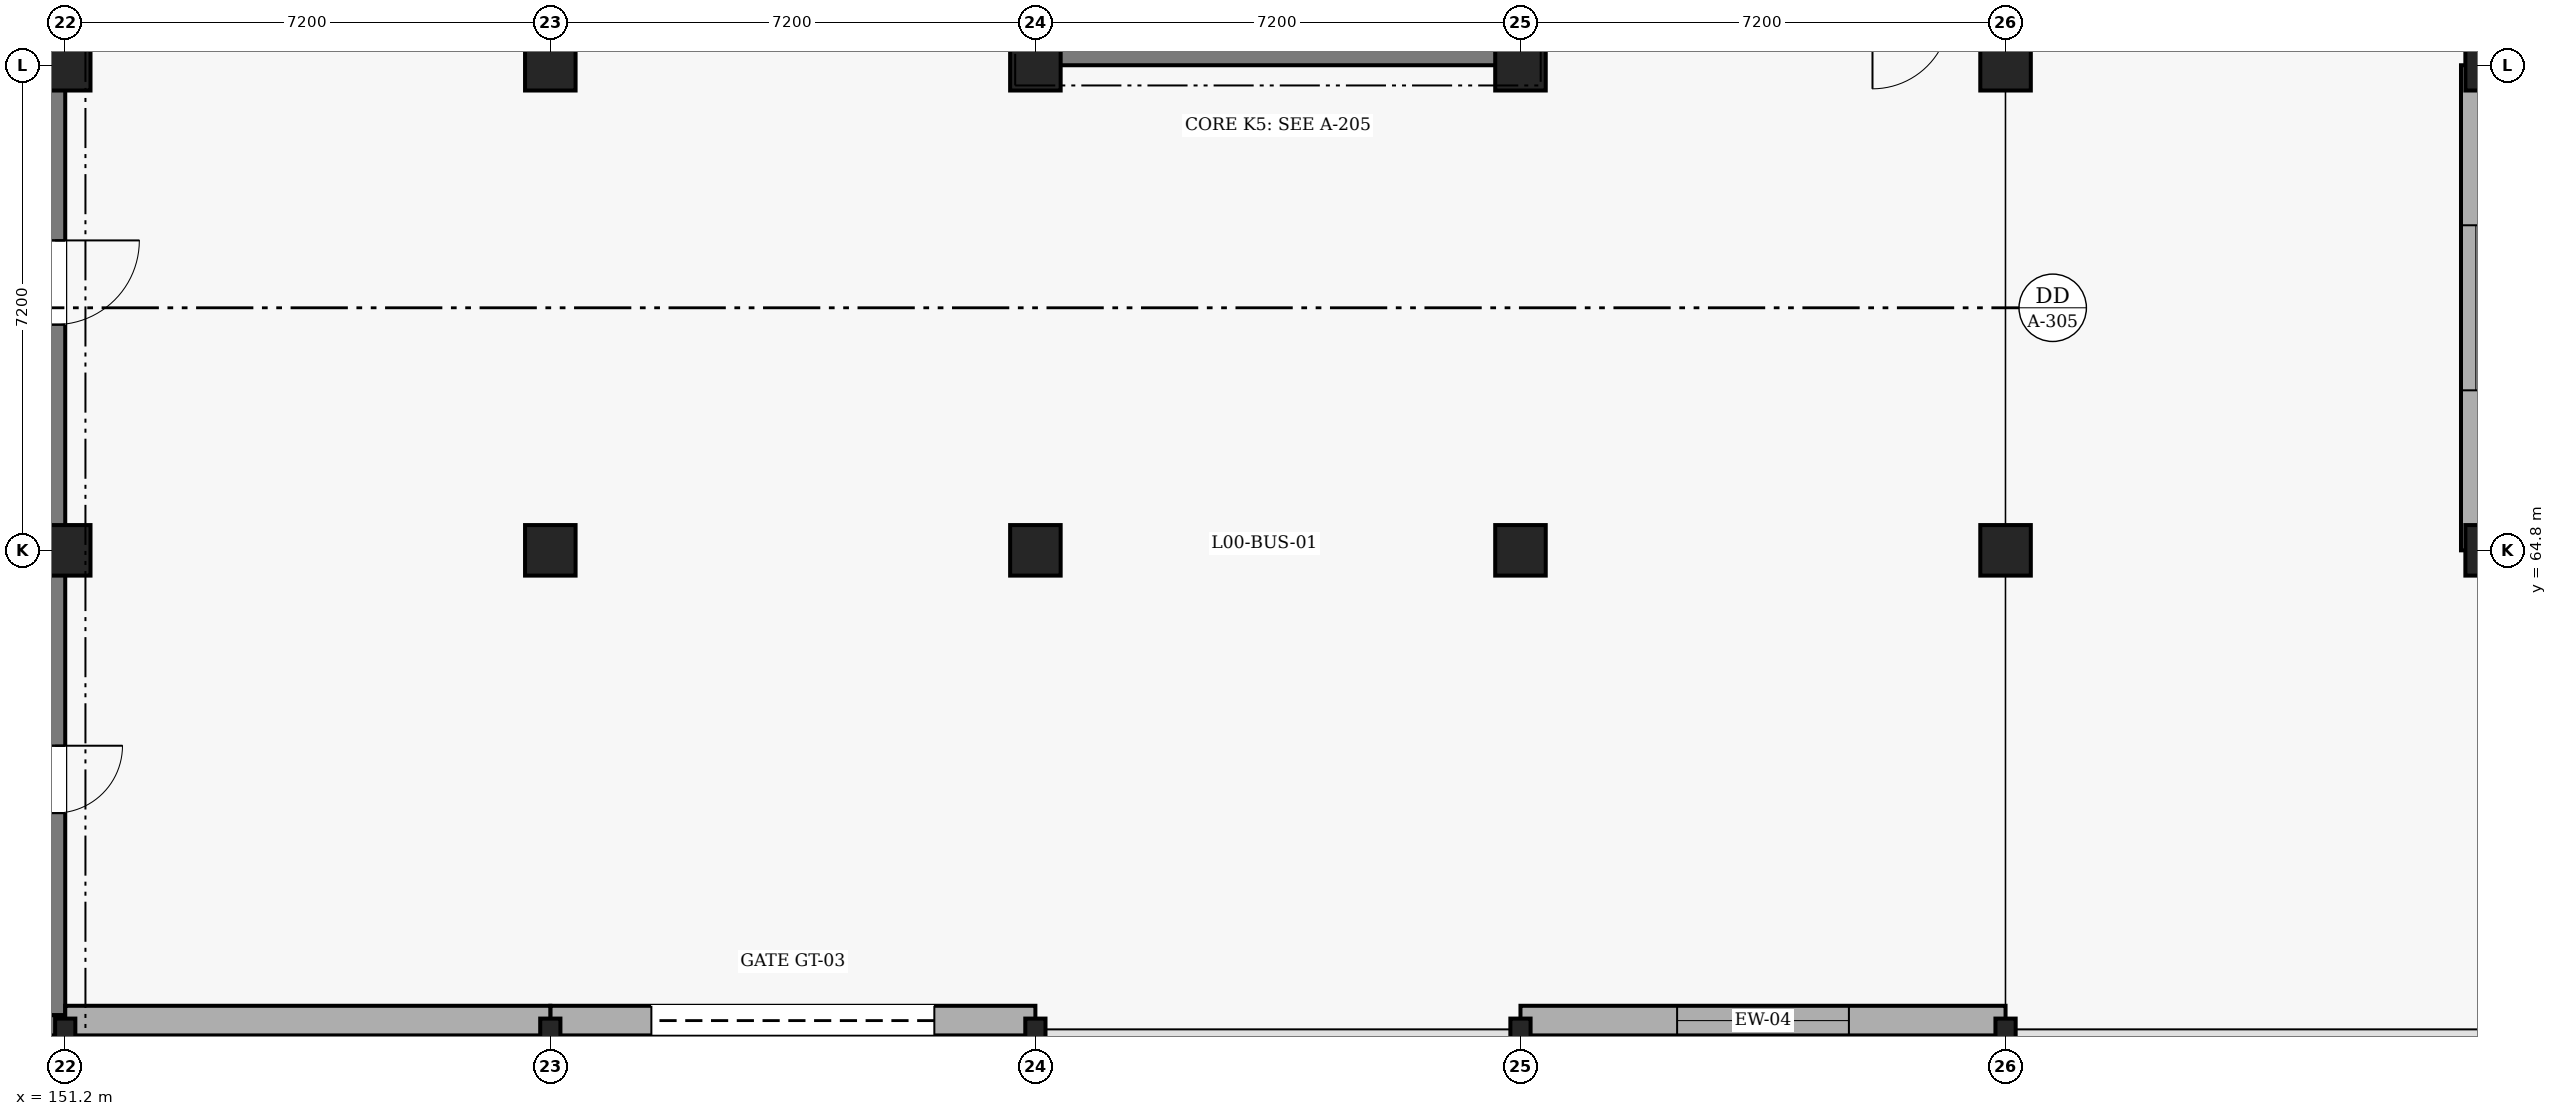
"""IFC4 building model, lengths in metres.
Left out: names, types, materials, properties, quantities, classifications, styles, units other than length and angle.
Written with IfcOpenShell. Run it as: python <this file> out.ifc"""

import sys

from ifc_helpers import new_model, si_unit, direction, frame, frame_2d, origin, origin_2d, place, context, subcontext, project, spatial, rectangle, i_section, extrude, element, fill, save


model = new_model("IFC4")
c1 = context("Model", 3, precision=1e-05, world=origin(), true_north=direction((0.0, 1.0)))
c2 = subcontext(c1, "Body", "Model", "MODEL_VIEW")
j1 = project(units=[si_unit("LENGTHUNIT", "METRE"), si_unit("PLANEANGLEUNIT", "RADIAN")], contexts=[c1])
p1 = place(None, origin())
s1 = spatial("IfcSite", under=j1, at=p1, CompositionType="ELEMENT")
p2 = place(p1, origin())
s2 = spatial("IfcBuilding", under=s1, at=p2, CompositionType="ELEMENT")
p3 = place(p2, origin())
s3 = spatial("IfcBuildingStorey", under=s2, at=p3, CompositionType="ELEMENT", Elevation=0.0)
p4 = place(p3, frame((136.8, 71.85, 0.0), z_axis=(0.0, 0.0, 1.0), x_axis=(1.0, 0.0, 0.0)))
e1 = element("IfcWall", 1, at=p4, inside=s3, PredefinedType="SHEAR", context=c2, shape_type="SweptSolid", body=[
    extrude(rectangle(XDim=14.4, YDim=0.3, at=frame_2d((7.2, 0.0))), origin(), (0.0, 0.0, 1.0), 5.4),
])
p5 = place(p3, frame((151.05, 71.7, 0.0), z_axis=(0.0, 0.0, 1.0), x_axis=(0.0, -1.0, 0.0)))
e2 = element("IfcWall", 2, at=p5, inside=s3, PredefinedType="SHEAR", context=c2, shape_type="SweptSolid", body=[
    extrude(rectangle(XDim=13.8, YDim=0.3, at=frame_2d((6.9, 0.0))), origin(), (0.0, 0.0, 1.0), 5.4),
])
p6 = place(p5, frame((9.8, 0.0, 0.0)))
e3 = element("IfcOpeningElement", 3, at=p6, cuts=e2, PredefinedType="OPENING", context=c2, shape_type="SweptSolid", body=[
    extrude(rectangle(XDim=1.0, YDim=2.15, at=frame_2d((0.5, 1.075))), frame((0.0, 0.16, 0.0), z_axis=(0.0, -1.0, 0.0), x_axis=(1.0, 0.0, 0.0)), (0.0, 0.0, 1.0), 0.32),
])
p7 = place(p5, frame((2.3, 0.0, 0.0)))
e4 = element("IfcOpeningElement", 4, at=p7, cuts=e2, PredefinedType="OPENING", context=c2, shape_type="SweptSolid", body=[
    extrude(rectangle(XDim=1.25, YDim=2.2, at=frame_2d((0.625, 1.1))), frame((0.0, 0.16, 0.0), z_axis=(0.0, -1.0, 0.0), x_axis=(1.0, 0.0, 0.0)), (0.0, 0.0, 1.0), 0.32),
])
p8 = place(p3, frame((151.2, 57.75, 0.0), z_axis=(0.0, 0.0, 1.0), x_axis=(-1.0, 0.0, 0.0)))
e5 = element("IfcWall", 5, at=p8, inside=s3, PredefinedType="SHEAR", context=c2, shape_type="SweptSolid", body=[
    extrude(rectangle(XDim=14.4, YDim=0.3, at=frame_2d((7.2, 0.0))), origin(), (0.0, 0.0, 1.0), 5.4),
])
p9 = place(p3, frame((172.8, 72.135, 0.0), z_axis=(0.0, 0.0, 1.0), x_axis=(-1.0, 0.0, 0.0)))
e6 = element("IfcWall", 6, at=p9, inside=s3, PredefinedType="SHEAR", context=c2, shape_type="SweptSolid", body=[
    extrude(rectangle(XDim=7.2, YDim=0.27, at=frame_2d((3.6, 0.0))), origin(), (0.0, 0.0, 1.0), 5.4),
])
p10 = place(p3, frame((151.2, 57.6, 0.0), z_axis=(0.0, 0.0, 1.0), x_axis=(1.0, 0.0, 0.0)))
e7 = element("IfcColumn", 7, at=p10, inside=s3, PredefinedType="COLUMN", context=c2, shape_type="SweptSolid", body=[
    extrude(i_section(OverallWidth=0.3, OverallDepth=0.5, WebThickness=0.014, FlangeThickness=0.028, FilletRadius=0.027, at=origin_2d()), origin(), (0.0, 0.0, 1.0), 5.1),
])
for number, where, z_axis, x_axis in (
    (8, (151.2, 64.8, 0.0), (0.0, 0.0, 1.0), (1.0, 0.0, 0.0)),
    (9, (151.2, 72.0, 0.0), (0.0, 0.0, 1.0), (1.0, 0.0, 0.0)),
):
    element("IfcColumn", number, at=place(p3, frame(where, z_axis=z_axis, x_axis=x_axis)), inside=s3, PredefinedType="COLUMN", context=c2, shape_type="SweptSolid", body=[
        extrude(rectangle(XDim=0.75, YDim=0.75, at=origin_2d()), origin(), (0.0, 0.0, 1.0), 5.1),
    ])
p11 = place(p3, frame((158.4, 57.6, 0.0), z_axis=(0.0, 0.0, 1.0), x_axis=(1.0, 0.0, 0.0)))
e10 = element("IfcColumn", 10, at=p11, inside=s3, PredefinedType="COLUMN", context=c2, shape_type="SweptSolid", body=[
    extrude(i_section(OverallWidth=0.3, OverallDepth=0.5, WebThickness=0.014, FlangeThickness=0.028, FilletRadius=0.027, at=origin_2d()), origin(), (0.0, 0.0, 1.0), 5.1),
])
for number, where, z_axis, x_axis in (
    (11, (158.4, 64.8, 0.0), (0.0, 0.0, 1.0), (1.0, 0.0, 0.0)),
    (12, (158.4, 72.0, 0.0), (0.0, 0.0, 1.0), (1.0, 0.0, 0.0)),
):
    element("IfcColumn", number, at=place(p3, frame(where, z_axis=z_axis, x_axis=x_axis)), inside=s3, PredefinedType="COLUMN", context=c2, shape_type="SweptSolid", body=[
        extrude(rectangle(XDim=0.75, YDim=0.75, at=origin_2d()), origin(), (0.0, 0.0, 1.0), 5.1),
    ])
p12 = place(p3, frame((165.6, 57.6, 0.0), z_axis=(0.0, 0.0, 1.0), x_axis=(1.0, 0.0, 0.0)))
e13 = element("IfcColumn", 13, at=p12, inside=s3, PredefinedType="COLUMN", context=c2, shape_type="SweptSolid", body=[
    extrude(i_section(OverallWidth=0.3, OverallDepth=0.5, WebThickness=0.014, FlangeThickness=0.028, FilletRadius=0.027, at=origin_2d()), origin(), (0.0, 0.0, 1.0), 5.1),
])
for number, where, z_axis, x_axis in (
    (14, (165.6, 64.8, 0.0), (0.0, 0.0, 1.0), (1.0, 0.0, 0.0)),
    (15, (165.6, 72.0, 0.0), (0.0, 0.0, 1.0), (1.0, 0.0, 0.0)),
):
    element("IfcColumn", number, at=place(p3, frame(where, z_axis=z_axis, x_axis=x_axis)), inside=s3, PredefinedType="COLUMN", context=c2, shape_type="SweptSolid", body=[
        extrude(rectangle(XDim=0.75, YDim=0.75, at=origin_2d()), origin(), (0.0, 0.0, 1.0), 5.1),
    ])
p13 = place(p3, frame((172.8, 57.6, 0.0), z_axis=(0.0, 0.0, 1.0), x_axis=(1.0, 0.0, 0.0)))
e16 = element("IfcColumn", 16, at=p13, inside=s3, PredefinedType="COLUMN", context=c2, shape_type="SweptSolid", body=[
    extrude(i_section(OverallWidth=0.3, OverallDepth=0.5, WebThickness=0.014, FlangeThickness=0.028, FilletRadius=0.027, at=origin_2d()), origin(), (0.0, 0.0, 1.0), 5.1),
])
for number, where, z_axis, x_axis in (
    (17, (172.8, 64.8, 0.0), (0.0, 0.0, 1.0), (1.0, 0.0, 0.0)),
    (18, (172.8, 72.0, 0.0), (0.0, 0.0, 1.0), (1.0, 0.0, 0.0)),
):
    element("IfcColumn", number, at=place(p3, frame(where, z_axis=z_axis, x_axis=x_axis)), inside=s3, PredefinedType="COLUMN", context=c2, shape_type="SweptSolid", body=[
        extrude(rectangle(XDim=0.75, YDim=0.75, at=origin_2d()), origin(), (0.0, 0.0, 1.0), 5.1),
    ])
p14 = place(p3, frame((180.0, 57.6, 0.0), z_axis=(0.0, 0.0, 1.0), x_axis=(1.0, 0.0, 0.0)))
e19 = element("IfcColumn", 19, at=p14, inside=s3, PredefinedType="COLUMN", context=c2, shape_type="SweptSolid", body=[
    extrude(i_section(OverallWidth=0.3, OverallDepth=0.5, WebThickness=0.014, FlangeThickness=0.028, FilletRadius=0.027, at=origin_2d()), origin(), (0.0, 0.0, 1.0), 5.1),
])
for number, where, z_axis, x_axis in (
    (20, (180.0, 64.8, 0.0), (0.0, 0.0, 1.0), (1.0, 0.0, 0.0)),
    (21, (180.0, 72.0, 0.0), (0.0, 0.0, 1.0), (1.0, 0.0, 0.0)),
    (22, (187.2, 64.8, 0.0), (0.0, 0.0, 1.0), (1.0, 0.0, 0.0)),
    (23, (187.2, 72.0, 0.0), (0.0, 0.0, 1.0), (1.0, 0.0, 0.0)),
):
    element("IfcColumn", number, at=place(p3, frame(where, z_axis=z_axis, x_axis=x_axis)), inside=s3, PredefinedType="COLUMN", context=c2, shape_type="SweptSolid", body=[
        extrude(rectangle(XDim=0.75, YDim=0.75, at=origin_2d()), origin(), (0.0, 0.0, 1.0), 5.1),
    ])
p15 = place(p3, frame((186.98, 72.0, 0.0), z_axis=(0.0, 0.0, 1.0), x_axis=(0.0, -1.0, 0.0)))
e24 = element("IfcWall", 24, at=p15, inside=s3, PredefinedType="SOLIDWALL", context=c2, shape_type="SweptSolid", body=[
    extrude(rectangle(XDim=7.2, YDim=0.44, at=frame_2d((3.6, 0.0))), origin(), (0.0, 0.0, 1.0), 4.77),
])
p16 = place(p15, frame((2.375, 0.0, 0.9)))
e25 = element("IfcOpeningElement", 25, at=p16, cuts=e24, PredefinedType="OPENING", context=c2, shape_type="SweptSolid", body=[
    extrude(rectangle(XDim=2.45, YDim=1.55, at=frame_2d((1.225, 0.775))), frame((0.0, 0.23, 0.0), z_axis=(0.0, -1.0, 0.0), x_axis=(1.0, 0.0, 0.0)), (0.0, 0.0, 1.0), 0.46),
])
p17 = place(p3, frame((180.0, 57.82, 0.0), z_axis=(0.0, 0.0, 1.0), x_axis=(-1.0, 0.0, 0.0)))
e26 = element("IfcWall", 26, at=p17, inside=s3, PredefinedType="SOLIDWALL", context=c2, shape_type="SweptSolid", body=[
    extrude(rectangle(XDim=7.2, YDim=0.44, at=frame_2d((3.6, 0.0))), origin(), (0.0, 0.0, 1.0), 4.6),
])
p18 = place(p17, frame((2.325, 0.0, 0.9)))
e27 = element("IfcOpeningElement", 27, at=p18, cuts=e26, PredefinedType="OPENING", context=c2, shape_type="SweptSolid", body=[
    extrude(rectangle(XDim=2.55, YDim=1.6, at=frame_2d((1.275, 0.8))), frame((0.0, 0.23, 0.0), z_axis=(0.0, -1.0, 0.0), x_axis=(1.0, 0.0, 0.0)), (0.0, 0.0, 1.0), 0.46),
])
p19 = place(p3, frame((165.6, 57.82, 0.0), z_axis=(0.0, 0.0, 1.0), x_axis=(-1.0, 0.0, 0.0)))
e28 = element("IfcWall", 28, at=p19, inside=s3, PredefinedType="SOLIDWALL", context=c2, shape_type="SweptSolid", body=[
    extrude(rectangle(XDim=7.2, YDim=0.44, at=frame_2d((3.6, 0.0))), origin(), (0.0, 0.0, 1.0), 4.6),
])
p20 = place(p19, frame((1.5, 0.0, 0.0)))
e29 = element("IfcOpeningElement", 29, at=p20, cuts=e28, PredefinedType="OPENING", context=c2, shape_type="SweptSolid", body=[
    extrude(rectangle(XDim=4.2, YDim=2.8, at=frame_2d((2.1, 1.4))), frame((0.0, 0.23, 0.0), z_axis=(0.0, -1.0, 0.0), x_axis=(1.0, 0.0, 0.0)), (0.0, 0.0, 1.0), 0.46),
])
p21 = place(p3, frame((158.4, 57.82, 0.0), z_axis=(0.0, 0.0, 1.0), x_axis=(-1.0, 0.0, 0.0)))
e30 = element("IfcWall", 30, at=p21, inside=s3, PredefinedType="SOLIDWALL", context=c2, shape_type="SweptSolid", body=[
    extrude(rectangle(XDim=7.2, YDim=0.44, at=frame_2d((3.6, 0.0))), origin(), (0.0, 0.0, 1.0), 4.6),
])
p22 = place(p16, origin())
e31 = element("IfcWindow", 31, at=p22, inside=s3, PartitioningType="SINGLE_PANEL", PredefinedType="WINDOW", context=c2, shape_type="SweptSolid", body=[
    extrude(rectangle(XDim=2.45, YDim=1.55, at=frame_2d((1.225, 0.775))), frame((0.0, 0.03, 0.0), z_axis=(0.0, -1.0, 0.0), x_axis=(1.0, 0.0, 0.0)), (0.0, 0.0, 1.0), 0.06),
])
fill(e25, e31)
p23 = place(p18, origin())
e32 = element("IfcWindow", 32, at=p23, inside=s3, PartitioningType="SINGLE_PANEL", PredefinedType="WINDOW", context=c2, shape_type="SweptSolid", body=[
    extrude(rectangle(XDim=2.55, YDim=1.6, at=frame_2d((1.275, 0.8))), frame((0.0, 0.03, 0.0), z_axis=(0.0, -1.0, 0.0), x_axis=(1.0, 0.0, 0.0)), (0.0, 0.0, 1.0), 0.06),
])
fill(e27, e32)
p24 = place(p20, origin())
e33 = element("IfcDoor", 33, at=p24, inside=s3, OperationType="ROLLINGUP", PredefinedType="GATE", context=c2, shape_type="SweptSolid", body=[
    extrude(rectangle(XDim=4.2, YDim=2.8, at=frame_2d((2.1, 1.4))), frame((0.0, 0.025, 0.0), z_axis=(0.0, -1.0, 0.0), x_axis=(1.0, 0.0, 0.0)), (0.0, 0.0, 1.0), 0.05),
])
fill(e29, e33)
p25 = place(p6, origin())
e34 = element("IfcDoor", 34, at=p25, inside=s3, OperationType="SINGLE_SWING_LEFT", PredefinedType="DOOR", context=c2, shape_type="SweptSolid", body=[
    extrude(rectangle(XDim=1.0, YDim=2.15, at=frame_2d((0.5, 1.075))), frame((0.0, 0.025, 0.0), z_axis=(0.0, -1.0, 0.0), x_axis=(1.0, 0.0, 0.0)), (0.0, 0.0, 1.0), 0.05),
])
fill(e3, e34)
p26 = place(p7, origin())
e35 = element("IfcDoor", 35, at=p26, inside=s3, OperationType="SINGLE_SWING_LEFT", PredefinedType="DOOR", context=c2, shape_type="SweptSolid", body=[
    extrude(rectangle(XDim=1.25, YDim=2.2, at=frame_2d((0.625, 1.1))), frame((0.0, 0.025, 0.0), z_axis=(0.0, -1.0, 0.0), x_axis=(1.0, 0.0, 0.0)), (0.0, 0.0, 1.0), 0.05),
])
fill(e4, e35)
save(model, sys.argv[1])
